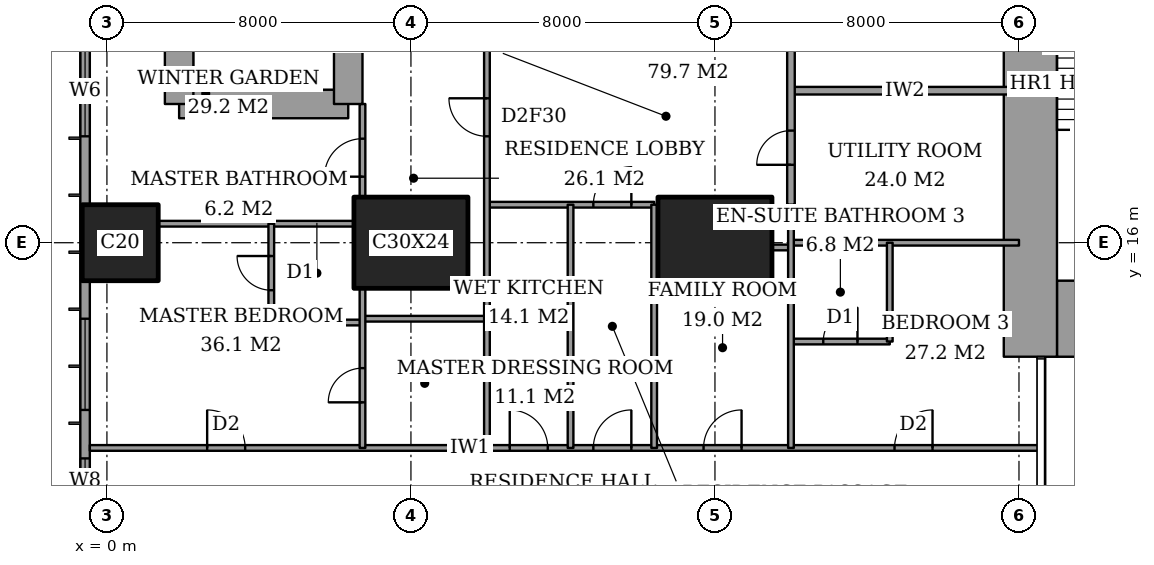
"""IFC4 building model, lengths in metres.
Left out: names, types, materials, properties, quantities, classifications, styles, units other than length and angle.
Written with IfcOpenShell. Run it as: python <this file> out.ifc"""

import sys

from ifc_helpers import new_model, si_unit, direction, frame, frame_2d, origin, origin_2d, place, context, subcontext, project, spatial, rectangle, extrude, element, fill, save


model = new_model("IFC4")
c1 = context("Model", 3, precision=1e-05, world=origin(), true_north=direction((0.0, 1.0)))
c2 = subcontext(c1, "Body", "Model", "MODEL_VIEW")
j1 = project(units=[si_unit("LENGTHUNIT", "METRE"), si_unit("PLANEANGLEUNIT", "RADIAN")], contexts=[c1])
p1 = place(None, origin())
s1 = spatial("IfcSite", under=j1, at=p1, CompositionType="ELEMENT")
p2 = place(p1, origin())
s2 = spatial("IfcBuilding", under=s1, at=p2, CompositionType="ELEMENT")
p3 = place(p2, frame((0.0, 0.0, 44.0)))
s3 = spatial("IfcBuildingStorey", under=s2, at=p3, CompositionType="ELEMENT", Elevation=44.0)
p4 = place(p3, frame((0.35, 16.0, 0.0), z_axis=(0.0, 0.0, 1.0), x_axis=(1.0, 0.0, 0.0)))
e1 = element("IfcColumn", 1, at=p4, inside=s3, PredefinedType="COLUMN", context=c2, shape_type="SweptSolid", body=[
    extrude(rectangle(XDim=2.0, YDim=2.0, at=origin_2d()), origin(), (0.0, 0.0, 1.0), 3.6),
])
for number, where, z_axis, x_axis in (
    (2, (8.0, 16.0, 0.0), (0.0, 0.0, 1.0), (1.0, 0.0, 0.0)),
    (3, (16.0, 16.0, 0.0), (0.0, 0.0, 1.0), (1.0, 0.0, 0.0)),
):
    element("IfcColumn", number, at=place(p3, frame(where, z_axis=z_axis, x_axis=x_axis)), inside=s3, PredefinedType="COLUMN", context=c2, shape_type="SweptSolid", body=[
        extrude(rectangle(XDim=3.0, YDim=2.4, at=origin_2d()), origin(), (0.0, 0.0, 1.0), 3.6),
    ])
p5 = place(p3, frame((25.0, 14.0, 0.0), z_axis=(0.0, 0.0, 1.0), x_axis=(1.0, 0.0, 0.0)))
e4 = element("IfcWall", 4, at=p5, inside=s3, PredefinedType="SHEAR", context=c2, shape_type="SweptSolid", body=[
    extrude(rectangle(XDim=3.15, YDim=2.0, at=frame_2d((1.575, 0.0))), origin(), (0.0, 0.0, 1.0), 3.6),
])
p6 = place(p3, frame((24.3, 13.0, 0.0), z_axis=(0.0, 0.0, 1.0), x_axis=(0.0, 1.0, 0.0)))
e5 = element("IfcWall", 5, at=p6, inside=s3, PredefinedType="SHEAR", context=c2, shape_type="SweptSolid", body=[
    extrude(rectangle(XDim=10.15, YDim=1.4, at=frame_2d((5.075, 0.0))), origin(), (0.0, 0.0, 1.0), 3.6),
])
p7 = place(p3, frame((1.9, 19.65, 0.0), z_axis=(0.0, 0.0, 1.0), x_axis=(1.0, 0.0, 0.0)))
e6 = element("IfcWall", 6, at=p7, inside=s3, PredefinedType="SHEAR", context=c2, shape_type="SweptSolid", body=[
    extrude(rectangle(XDim=4.45, YDim=0.75, at=frame_2d((2.225, 0.0))), origin(), (0.0, 0.0, 1.0), 3.6),
])
p8 = place(p3, frame((6.35, 19.65, 0.0), z_axis=(0.0, 0.0, 1.0), x_axis=(0.0, 1.0, 0.0)))
e7 = element("IfcWall", 7, at=p8, inside=s3, PredefinedType="SHEAR", context=c2, shape_type="SweptSolid", body=[
    extrude(rectangle(XDim=8.7, YDim=0.75, at=frame_2d((4.35, 0.0))), origin(), (0.0, 0.0, 1.0), 3.6),
])
p9 = place(p8, frame((6.725, 0.0, 0.0)))
e8 = element("IfcOpeningElement", 8, at=p9, cuts=e7, PredefinedType="OPENING", context=c2, shape_type="SweptSolid", body=[
    extrude(rectangle(XDim=1.0, YDim=2.1, at=frame_2d((0.5, 1.05))), frame((0.0, 0.385, 0.0), z_axis=(0.0, -1.0, 0.0), x_axis=(1.0, 0.0, 0.0)), (0.0, 0.0, 1.0), 0.77),
])
p10 = place(p3, frame((1.9, 28.35, 0.0), z_axis=(0.0, 0.0, 1.0), x_axis=(0.0, -1.0, 0.0)))
e9 = element("IfcWall", 9, at=p10, inside=s3, PredefinedType="SHEAR", context=c2, shape_type="SweptSolid", body=[
    extrude(rectangle(XDim=8.7, YDim=0.75, at=frame_2d((4.35, 0.0))), origin(), (0.0, 0.0, 1.0), 3.6),
])
p11 = place(p3, frame((-0.575, 44.825, 0.0), z_axis=(0.0, 0.0, 1.0), x_axis=(0.0, -1.0, 0.0)))
e10 = element("IfcWall", 10, at=p11, inside=s3, PredefinedType="SOLIDWALL", context=c2, shape_type="SweptSolid", body=[
    extrude(rectangle(XDim=41.65, YDim=0.25, at=frame_2d((20.825, 0.0))), origin(), (0.0, 0.0, 1.0), 3.6),
])
p12 = place(p11, frame((0.775, 0.0, 0.6)))
e11 = element("IfcOpeningElement", 11, at=p12, cuts=e10, PredefinedType="OPENING", context=c2, shape_type="SweptSolid", body=[
    extrude(rectangle(XDim=2.4, YDim=2.0, at=frame_2d((1.2, 1.0))), frame((0.0, 0.135, 0.0), z_axis=(0.0, -1.0, 0.0), x_axis=(1.0, 0.0, 0.0)), (0.0, 0.0, 1.0), 0.27),
])
p13 = place(p11, frame((6.1, 0.0, 0.6)))
e12 = element("IfcOpeningElement", 12, at=p13, cuts=e10, PredefinedType="OPENING", context=c2, shape_type="SweptSolid", body=[
    extrude(rectangle(XDim=1.2, YDim=2.0, at=frame_2d((0.6, 1.0))), frame((0.0, 0.135, 0.0), z_axis=(0.0, -1.0, 0.0), x_axis=(1.0, 0.0, 0.0)), (0.0, 0.0, 1.0), 0.27),
])
p14 = place(p11, frame((8.425, 0.0, 0.6)))
e13 = element("IfcOpeningElement", 13, at=p14, cuts=e10, PredefinedType="OPENING", context=c2, shape_type="SweptSolid", body=[
    extrude(rectangle(XDim=2.4, YDim=2.0, at=frame_2d((1.2, 1.0))), frame((0.0, 0.135, 0.0), z_axis=(0.0, -1.0, 0.0), x_axis=(1.0, 0.0, 0.0)), (0.0, 0.0, 1.0), 0.27),
])
p15 = place(p11, frame((15.625, 0.0, 0.6)))
e14 = element("IfcOpeningElement", 14, at=p15, cuts=e10, PredefinedType="OPENING", context=c2, shape_type="SweptSolid", body=[
    extrude(rectangle(XDim=2.4, YDim=2.0, at=frame_2d((1.2, 1.0))), frame((0.0, 0.135, 0.0), z_axis=(0.0, -1.0, 0.0), x_axis=(1.0, 0.0, 0.0)), (0.0, 0.0, 1.0), 0.27),
])
p16 = place(p11, frame((23.625, 0.0, 0.6)))
e15 = element("IfcOpeningElement", 15, at=p16, cuts=e10, PredefinedType="OPENING", context=c2, shape_type="SweptSolid", body=[
    extrude(rectangle(XDim=2.4, YDim=2.0, at=frame_2d((1.2, 1.0))), frame((0.0, 0.135, 0.0), z_axis=(0.0, -1.0, 0.0), x_axis=(1.0, 0.0, 0.0)), (0.0, 0.0, 1.0), 0.27),
])
p17 = place(p11, frame((30.825, 0.0, 0.6)))
e16 = element("IfcOpeningElement", 16, at=p17, cuts=e10, PredefinedType="OPENING", context=c2, shape_type="SweptSolid", body=[
    extrude(rectangle(XDim=2.4, YDim=2.0, at=frame_2d((1.2, 1.0))), frame((0.0, 0.135, 0.0), z_axis=(0.0, -1.0, 0.0), x_axis=(1.0, 0.0, 0.0)), (0.0, 0.0, 1.0), 0.27),
])
p18 = place(p11, frame((34.5, 0.0, 0.6)))
e17 = element("IfcOpeningElement", 17, at=p18, cuts=e10, PredefinedType="OPENING", context=c2, shape_type="SweptSolid", body=[
    extrude(rectangle(XDim=1.2, YDim=2.0, at=frame_2d((0.6, 1.0))), frame((0.0, 0.135, 0.0), z_axis=(0.0, -1.0, 0.0), x_axis=(1.0, 0.0, 0.0)), (0.0, 0.0, 1.0), 0.27),
])
p19 = place(p11, frame((38.475, 0.0, 0.6)))
e18 = element("IfcOpeningElement", 18, at=p19, cuts=e10, PredefinedType="OPENING", context=c2, shape_type="SweptSolid", body=[
    extrude(rectangle(XDim=2.4, YDim=2.0, at=frame_2d((1.2, 1.0))), frame((0.0, 0.135, 0.0), z_axis=(0.0, -1.0, 0.0), x_axis=(1.0, 0.0, 0.0)), (0.0, 0.0, 1.0), 0.27),
])
p20 = place(p3, frame((-0.45, 10.6, 0.0), z_axis=(0.0, 0.0, 1.0), x_axis=(1.0, 0.0, 0.0)))
e19 = element("IfcWall", 19, at=p20, inside=s3, PredefinedType="PARTITIONING", context=c2, shape_type="SweptSolid", body=[
    extrude(rectangle(XDim=25.011, YDim=0.15, at=frame_2d((12.505, 0.0))), origin(), (0.0, 0.0, 1.0), 3.35),
])
p21 = place(p20, frame((13.25, 0.0, 0.0)))
e20 = element("IfcOpeningElement", 20, at=p21, cuts=e19, PredefinedType="OPENING", context=c2, shape_type="SweptSolid", body=[
    extrude(rectangle(XDim=1.0, YDim=2.1, at=frame_2d((0.5, 1.05))), frame((0.0, 0.085, 0.0), z_axis=(0.0, -1.0, 0.0), x_axis=(1.0, 0.0, 0.0)), (0.0, 0.0, 1.0), 0.17),
])
p22 = place(p20, frame((3.087, 0.0, 0.0)))
e21 = element("IfcOpeningElement", 21, at=p22, cuts=e19, PredefinedType="OPENING", context=c2, shape_type="SweptSolid", body=[
    extrude(rectangle(XDim=1.0, YDim=2.1, at=frame_2d((0.5, 1.05))), frame((0.0, 0.085, 0.0), z_axis=(0.0, -1.0, 0.0), x_axis=(1.0, 0.0, 0.0)), (0.0, 0.0, 1.0), 0.17),
])
p23 = place(p20, frame((11.05, 0.0, 0.0)))
e22 = element("IfcOpeningElement", 22, at=p23, cuts=e19, PredefinedType="OPENING", context=c2, shape_type="SweptSolid", body=[
    extrude(rectangle(XDim=1.0, YDim=2.1, at=frame_2d((0.5, 1.05))), frame((0.0, 0.085, 0.0), z_axis=(0.0, -1.0, 0.0), x_axis=(1.0, 0.0, 0.0)), (0.0, 0.0, 1.0), 0.17),
])
p24 = place(p20, frame((16.15, 0.0, 0.0)))
e23 = element("IfcOpeningElement", 23, at=p24, cuts=e19, PredefinedType="OPENING", context=c2, shape_type="SweptSolid", body=[
    extrude(rectangle(XDim=1.0, YDim=2.1, at=frame_2d((0.5, 1.05))), frame((0.0, 0.085, 0.0), z_axis=(0.0, -1.0, 0.0), x_axis=(1.0, 0.0, 0.0)), (0.0, 0.0, 1.0), 0.17),
])
p25 = place(p20, frame((21.175, 0.0, 0.0)))
e24 = element("IfcOpeningElement", 24, at=p25, cuts=e19, PredefinedType="OPENING", context=c2, shape_type="SweptSolid", body=[
    extrude(rectangle(XDim=1.0, YDim=2.1, at=frame_2d((0.5, 1.05))), frame((0.0, 0.085, 0.0), z_axis=(0.0, -1.0, 0.0), x_axis=(1.0, 0.0, 0.0)), (0.0, 0.0, 1.0), 0.17),
])
p26 = place(p3, frame((18.0, 13.4, 0.0), z_axis=(0.0, 0.0, 1.0), x_axis=(1.0, 0.0, 0.0)))
e25 = element("IfcWall", 25, at=p26, inside=s3, PredefinedType="PARTITIONING", context=c2, shape_type="SweptSolid", body=[
    extrude(rectangle(XDim=2.6, YDim=0.15, at=frame_2d((1.3, 0.0))), origin(), (0.0, 0.0, 1.0), 3.35),
])
p27 = place(p26, frame((0.85, 0.0, 0.0)))
e26 = element("IfcOpeningElement", 26, at=p27, cuts=e25, PredefinedType="OPENING", context=c2, shape_type="SweptSolid", body=[
    extrude(rectangle(XDim=0.9, YDim=2.1, at=frame_2d((0.45, 1.05))), frame((0.0, 0.085, 0.0), z_axis=(0.0, -1.0, 0.0), x_axis=(1.0, 0.0, 0.0)), (0.0, 0.0, 1.0), 0.17),
])
p28 = place(p3, frame((4.325, 13.9, 0.0), z_axis=(0.0, 0.0, 1.0), x_axis=(1.0, 0.0, 0.0)))
e27 = element("IfcWall", 27, at=p28, inside=s3, PredefinedType="PARTITIONING", context=c2, shape_type="SweptSolid", body=[
    extrude(rectangle(XDim=2.4, YDim=0.15, at=frame_2d((1.2, 0.0))), origin(), (0.0, 0.0, 1.0), 3.35),
])
p29 = place(p3, frame((6.725, 14.0, 0.0), z_axis=(0.0, 0.0, 1.0), x_axis=(1.0, 0.0, 0.0)))
e28 = element("IfcWall", 28, at=p29, inside=s3, PredefinedType="PARTITIONING", context=c2, shape_type="SweptSolid", body=[
    extrude(rectangle(XDim=3.275, YDim=0.15, at=frame_2d((1.637, 0.0))), origin(), (0.0, 0.0, 1.0), 3.35),
])
p30 = place(p3, frame((17.5, 15.875, 0.0), z_axis=(0.0, 0.0, 1.0), x_axis=(1.0, 0.0, 0.0)))
e29 = element("IfcWall", 29, at=p30, inside=s3, PredefinedType="PARTITIONING", context=c2, shape_type="SweptSolid", body=[
    extrude(rectangle(XDim=0.5, YDim=0.15, at=frame_2d((0.25, 0.0))), origin(), (0.0, 0.0, 1.0), 2.634),
])
p31 = place(p3, frame((18.0, 16.0, 0.0), z_axis=(0.0, 0.0, 1.0), x_axis=(1.0, 0.0, 0.0)))
e30 = element("IfcWall", 30, at=p31, inside=s3, PredefinedType="PARTITIONING", context=c2, shape_type="SweptSolid", body=[
    extrude(rectangle(XDim=6.0, YDim=0.15, at=frame_2d((3.0, 0.0))), origin(), (0.0, 0.0, 1.0), 2.634),
])
p32 = place(p3, frame((1.35, 16.5, 0.0), z_axis=(0.0, 0.0, 1.0), x_axis=(1.0, 0.0, 0.0)))
e31 = element("IfcWall", 31, at=p32, inside=s3, PredefinedType="PARTITIONING", context=c2, shape_type="SweptSolid", body=[
    extrude(rectangle(XDim=5.15, YDim=0.15, at=frame_2d((2.575, 0.0))), origin(), (0.0, 0.0, 1.0), 3.35),
])
p33 = place(p3, frame((10.0, 17.0, 0.0), z_axis=(0.0, 0.0, 1.0), x_axis=(1.0, 0.0, 0.0)))
e32 = element("IfcWall", 32, at=p33, inside=s3, PredefinedType="PARTITIONING", context=c2, shape_type="SweptSolid", body=[
    extrude(rectangle(XDim=4.4, YDim=0.15, at=frame_2d((2.2, 0.0))), origin(), (0.0, 0.0, 1.0), 3.35),
])
p34 = place(p33, frame((2.8, 0.0, 0.0)))
e33 = element("IfcOpeningElement", 33, at=p34, cuts=e32, PredefinedType="OPENING", context=c2, shape_type="SweptSolid", body=[
    extrude(rectangle(XDim=1.0, YDim=2.1, at=frame_2d((0.5, 1.05))), frame((0.0, 0.085, 0.0), z_axis=(0.0, -1.0, 0.0), x_axis=(1.0, 0.0, 0.0)), (0.0, 0.0, 1.0), 0.17),
])
p35 = place(p3, frame((18.0, 20.0, 0.0), z_axis=(0.0, 0.0, 1.0), x_axis=(1.0, 0.0, 0.0)))
e34 = element("IfcWall", 34, at=p35, inside=s3, PredefinedType="PARTITIONING", context=c2, shape_type="SweptSolid", body=[
    extrude(rectangle(XDim=6.0, YDim=0.2, at=frame_2d((3.0, 0.0))), origin(), (0.0, 0.0, 1.0), 3.35),
])
p36 = place(p3, frame((4.325, 13.9, 0.0), z_axis=(0.0, 0.0, 1.0), x_axis=(0.0, 1.0, 0.0)))
e35 = element("IfcWall", 35, at=p36, inside=s3, PredefinedType="PARTITIONING", context=c2, shape_type="SweptSolid", body=[
    extrude(rectangle(XDim=2.6, YDim=0.15, at=frame_2d((1.3, 0.0))), origin(), (0.0, 0.0, 1.0), 3.35),
])
p37 = place(p36, frame((0.85, 0.0, 0.0)))
e36 = element("IfcOpeningElement", 36, at=p37, cuts=e35, PredefinedType="OPENING", context=c2, shape_type="SweptSolid", body=[
    extrude(rectangle(XDim=0.9, YDim=2.1, at=frame_2d((0.45, 1.05))), frame((0.0, 0.085, 0.0), z_axis=(0.0, -1.0, 0.0), x_axis=(1.0, 0.0, 0.0)), (0.0, 0.0, 1.0), 0.17),
])
p38 = place(p3, frame((6.725, 10.6, 0.0), z_axis=(0.0, 0.0, 1.0), x_axis=(0.0, 1.0, 0.0)))
e37 = element("IfcWall", 37, at=p38, inside=s3, PredefinedType="PARTITIONING", context=c2, shape_type="SweptSolid", body=[
    extrude(rectangle(XDim=4.2, YDim=0.15, at=frame_2d((2.1, 0.0))), origin(), (0.0, 0.0, 1.0), 3.35),
])
p39 = place(p38, frame((1.2, 0.0, 0.0)))
e38 = element("IfcOpeningElement", 38, at=p39, cuts=e37, PredefinedType="OPENING", context=c2, shape_type="SweptSolid", body=[
    extrude(rectangle(XDim=0.9, YDim=2.1, at=frame_2d((0.45, 1.05))), frame((0.0, 0.085, 0.0), z_axis=(0.0, -1.0, 0.0), x_axis=(1.0, 0.0, 0.0)), (0.0, 0.0, 1.0), 0.17),
])
p40 = place(p3, frame((6.725, 17.2, 0.0), z_axis=(0.0, 0.0, 1.0), x_axis=(0.0, 1.0, 0.0)))
e39 = element("IfcWall", 39, at=p40, inside=s3, PredefinedType="PARTITIONING", context=c2, shape_type="SweptSolid", body=[
    extrude(rectangle(XDim=2.45, YDim=0.15, at=frame_2d((1.225, 0.0))), origin(), (0.0, 0.0, 1.0), 3.35),
])
p41 = place(p40, frame((0.538, 0.0, 0.0)))
e40 = element("IfcOpeningElement", 40, at=p41, cuts=e39, PredefinedType="OPENING", context=c2, shape_type="SweptSolid", body=[
    extrude(rectangle(XDim=1.0, YDim=2.1, at=frame_2d((0.5, 1.05))), frame((0.0, 0.085, 0.0), z_axis=(0.0, -1.0, 0.0), x_axis=(1.0, 0.0, 0.0)), (0.0, 0.0, 1.0), 0.17),
])
p42 = place(p3, frame((10.0, 10.6, 0.0), z_axis=(0.0, 0.0, 1.0), x_axis=(0.0, 1.0, 0.0)))
e41 = element("IfcWall", 41, at=p42, inside=s3, PredefinedType="PARTITIONING", context=c2, shape_type="SweptSolid", body=[
    extrude(rectangle(XDim=11.0, YDim=0.15, at=frame_2d((5.5, 0.0))), origin(), (0.0, 0.0, 1.0), 3.35),
])
p43 = place(p42, frame((8.2, 0.0, 0.0)))
e42 = element("IfcOpeningElement", 42, at=p43, cuts=e41, PredefinedType="OPENING", context=c2, shape_type="SweptSolid", body=[
    extrude(rectangle(XDim=1.0, YDim=2.1, at=frame_2d((0.5, 1.05))), frame((0.0, 0.085, 0.0), z_axis=(0.0, -1.0, 0.0), x_axis=(1.0, 0.0, 0.0)), (0.0, 0.0, 1.0), 0.17),
])
for number, where, z_axis, x_axis in (
    (43, (12.2, 10.6, 0.0), (0.0, 0.0, 1.0), (0.0, 1.0, 0.0)),
    (44, (14.4, 10.6, 0.0), (0.0, 0.0, 1.0), (0.0, 1.0, 0.0)),
):
    element("IfcWall", number, at=place(p3, frame(where, z_axis=z_axis, x_axis=x_axis)), inside=s3, PredefinedType="PARTITIONING", context=c2, shape_type="SweptSolid", body=[
        extrude(rectangle(XDim=6.4, YDim=0.15, at=frame_2d((3.2, 0.0))), origin(), (0.0, 0.0, 1.0), 3.35),
    ])
p44 = place(p3, frame((18.0, 17.0, 0.0), z_axis=(0.0, 0.0, 1.0), x_axis=(0.0, 1.0, 0.0)))
e45 = element("IfcWall", 45, at=p44, inside=s3, PredefinedType="PARTITIONING", context=c2, shape_type="SweptSolid", body=[
    extrude(rectangle(XDim=7.0, YDim=0.2, at=frame_2d((3.5, 0.0))), origin(), (0.0, 0.0, 1.0), 3.35),
])
p45 = place(p44, frame((4.4, 0.0, 0.0)))
e46 = element("IfcOpeningElement", 46, at=p45, cuts=e45, PredefinedType="OPENING", context=c2, shape_type="SweptSolid", body=[
    extrude(rectangle(XDim=1.2, YDim=2.4, at=frame_2d((0.6, 1.2))), frame((0.0, 0.11, 0.0), z_axis=(0.0, -1.0, 0.0), x_axis=(1.0, 0.0, 0.0)), (0.0, 0.0, 1.0), 0.22),
])
p46 = place(p44, frame((1.05, 0.0, 0.0)))
e47 = element("IfcOpeningElement", 47, at=p46, cuts=e45, PredefinedType="OPENING", context=c2, shape_type="SweptSolid", body=[
    extrude(rectangle(XDim=0.9, YDim=2.1, at=frame_2d((0.45, 1.05))), frame((0.0, 0.11, 0.0), z_axis=(0.0, -1.0, 0.0), x_axis=(1.0, 0.0, 0.0)), (0.0, 0.0, 1.0), 0.22),
])
p47 = place(p3, frame((18.0, 10.6, 0.0), z_axis=(0.0, 0.0, 1.0), x_axis=(0.0, 1.0, 0.0)))
e48 = element("IfcWall", 48, at=p47, inside=s3, PredefinedType="PARTITIONING", context=c2, shape_type="SweptSolid", body=[
    extrude(rectangle(XDim=6.4, YDim=0.15, at=frame_2d((3.2, 0.0))), origin(), (0.0, 0.0, 1.0), 3.35),
])
p48 = place(p3, frame((20.6, 13.4, 0.0), z_axis=(0.0, 0.0, 1.0), x_axis=(0.0, 1.0, 0.0)))
e49 = element("IfcWall", 49, at=p48, inside=s3, PredefinedType="PARTITIONING", context=c2, shape_type="SweptSolid", body=[
    extrude(rectangle(XDim=2.6, YDim=0.15, at=frame_2d((1.3, 0.0))), origin(), (0.0, 0.0, 1.0), 3.35),
])
p49 = place(p16, origin())
e50 = element("IfcWindow", 50, at=p49, inside=s3, PartitioningType="SINGLE_PANEL", PredefinedType="WINDOW", context=c2, shape_type="SweptSolid", body=[
    extrude(rectangle(XDim=2.4, YDim=2.0, at=frame_2d((1.2, 1.0))), frame((0.0, 0.03, 0.0), z_axis=(0.0, -1.0, 0.0), x_axis=(1.0, 0.0, 0.0)), (0.0, 0.0, 1.0), 0.06),
])
fill(e15, e50)
p50 = place(p17, origin())
e51 = element("IfcWindow", 51, at=p50, inside=s3, PartitioningType="SINGLE_PANEL", PredefinedType="WINDOW", context=c2, shape_type="SweptSolid", body=[
    extrude(rectangle(XDim=2.4, YDim=2.0, at=frame_2d((1.2, 1.0))), frame((0.0, 0.03, 0.0), z_axis=(0.0, -1.0, 0.0), x_axis=(1.0, 0.0, 0.0)), (0.0, 0.0, 1.0), 0.06),
])
fill(e16, e51)
p51 = place(p18, origin())
e52 = element("IfcWindow", 52, at=p51, inside=s3, PartitioningType="SINGLE_PANEL", PredefinedType="WINDOW", context=c2, shape_type="SweptSolid", body=[
    extrude(rectangle(XDim=1.2, YDim=2.0, at=frame_2d((0.6, 1.0))), frame((0.0, 0.03, 0.0), z_axis=(0.0, -1.0, 0.0), x_axis=(1.0, 0.0, 0.0)), (0.0, 0.0, 1.0), 0.06),
])
fill(e17, e52)
p52 = place(p21, origin())
e53 = element("IfcDoor", 53, at=p52, inside=s3, OperationType="SINGLE_SWING_LEFT", PredefinedType="DOOR", context=c2, shape_type="SweptSolid", body=[
    extrude(rectangle(XDim=1.0, YDim=2.1, at=frame_2d((0.5, 1.05))), frame((0.0, 0.025, 0.0), z_axis=(0.0, -1.0, 0.0), x_axis=(1.0, 0.0, 0.0)), (0.0, 0.0, 1.0), 0.05),
])
fill(e20, e53)
p53 = place(p37, origin())
e54 = element("IfcDoor", 54, at=p53, inside=s3, OperationType="SINGLE_SWING_LEFT", PredefinedType="DOOR", context=c2, shape_type="SweptSolid", body=[
    extrude(rectangle(XDim=0.9, YDim=2.1, at=frame_2d((0.45, 1.05))), frame((0.0, 0.025, 0.0), z_axis=(0.0, -1.0, 0.0), x_axis=(1.0, 0.0, 0.0)), (0.0, 0.0, 1.0), 0.05),
])
fill(e36, e54)
p54 = place(p22, origin())
e55 = element("IfcDoor", 55, at=p54, inside=s3, OperationType="SINGLE_SWING_RIGHT", PredefinedType="DOOR", context=c2, shape_type="SweptSolid", body=[
    extrude(rectangle(XDim=1.0, YDim=2.1, at=frame_2d((0.5, 1.05))), frame((0.0, 0.025, 0.0), z_axis=(0.0, -1.0, 0.0), x_axis=(1.0, 0.0, 0.0)), (0.0, 0.0, 1.0), 0.05),
])
fill(e21, e55)
p55 = place(p41, origin())
e56 = element("IfcDoor", 56, at=p55, inside=s3, OperationType="SINGLE_SWING_RIGHT", PredefinedType="DOOR", context=c2, shape_type="SweptSolid", body=[
    extrude(rectangle(XDim=1.0, YDim=2.1, at=frame_2d((0.5, 1.05))), frame((0.0, 0.025, 0.0), z_axis=(0.0, -1.0, 0.0), x_axis=(1.0, 0.0, 0.0)), (0.0, 0.0, 1.0), 0.05),
])
fill(e40, e56)
p56 = place(p39, origin())
e57 = element("IfcDoor", 57, at=p56, inside=s3, OperationType="SINGLE_SWING_RIGHT", PredefinedType="DOOR", context=c2, shape_type="SweptSolid", body=[
    extrude(rectangle(XDim=0.9, YDim=2.1, at=frame_2d((0.45, 1.05))), frame((0.0, 0.025, 0.0), z_axis=(0.0, -1.0, 0.0), x_axis=(1.0, 0.0, 0.0)), (0.0, 0.0, 1.0), 0.05),
])
fill(e38, e57)
p57 = place(p43, origin())
e58 = element("IfcDoor", 58, at=p57, inside=s3, OperationType="SINGLE_SWING_LEFT", PredefinedType="DOOR", context=c2, shape_type="SweptSolid", body=[
    extrude(rectangle(XDim=1.0, YDim=2.1, at=frame_2d((0.5, 1.05))), frame((0.0, 0.025, 0.0), z_axis=(0.0, -1.0, 0.0), x_axis=(1.0, 0.0, 0.0)), (0.0, 0.0, 1.0), 0.05),
])
fill(e42, e58)
p58 = place(p23, origin())
e59 = element("IfcDoor", 59, at=p58, inside=s3, OperationType="SINGLE_SWING_RIGHT", PredefinedType="DOOR", context=c2, shape_type="SweptSolid", body=[
    extrude(rectangle(XDim=1.0, YDim=2.1, at=frame_2d((0.5, 1.05))), frame((0.0, 0.025, 0.0), z_axis=(0.0, -1.0, 0.0), x_axis=(1.0, 0.0, 0.0)), (0.0, 0.0, 1.0), 0.05),
])
fill(e22, e59)
p59 = place(p34, origin())
e60 = element("IfcDoor", 60, at=p59, inside=s3, OperationType="SINGLE_SWING_LEFT", PredefinedType="DOOR", context=c2, shape_type="SweptSolid", body=[
    extrude(rectangle(XDim=1.0, YDim=2.1, at=frame_2d((0.5, 1.05))), frame((0.0, 0.025, 0.0), z_axis=(0.0, -1.0, 0.0), x_axis=(1.0, 0.0, 0.0)), (0.0, 0.0, 1.0), 0.05),
])
fill(e33, e60)
p60 = place(p24, origin())
e61 = element("IfcDoor", 61, at=p60, inside=s3, OperationType="SINGLE_SWING_LEFT", PredefinedType="DOOR", context=c2, shape_type="SweptSolid", body=[
    extrude(rectangle(XDim=1.0, YDim=2.1, at=frame_2d((0.5, 1.05))), frame((0.0, 0.025, 0.0), z_axis=(0.0, -1.0, 0.0), x_axis=(1.0, 0.0, 0.0)), (0.0, 0.0, 1.0), 0.05),
])
fill(e23, e61)
p61 = place(p27, origin())
e62 = element("IfcDoor", 62, at=p61, inside=s3, OperationType="SINGLE_SWING_LEFT", PredefinedType="DOOR", context=c2, shape_type="SweptSolid", body=[
    extrude(rectangle(XDim=0.9, YDim=2.1, at=frame_2d((0.45, 1.05))), frame((0.0, 0.025, 0.0), z_axis=(0.0, -1.0, 0.0), x_axis=(1.0, 0.0, 0.0)), (0.0, 0.0, 1.0), 0.05),
])
fill(e26, e62)
p62 = place(p25, origin())
e63 = element("IfcDoor", 63, at=p62, inside=s3, OperationType="SINGLE_SWING_LEFT", PredefinedType="DOOR", context=c2, shape_type="SweptSolid", body=[
    extrude(rectangle(XDim=1.0, YDim=2.1, at=frame_2d((0.5, 1.05))), frame((0.0, 0.025, 0.0), z_axis=(0.0, -1.0, 0.0), x_axis=(1.0, 0.0, 0.0)), (0.0, 0.0, 1.0), 0.05),
])
fill(e24, e63)
p63 = place(p46, origin())
e64 = element("IfcDoor", 64, at=p63, inside=s3, OperationType="SINGLE_SWING_RIGHT", PredefinedType="DOOR", context=c2, shape_type="SweptSolid", body=[
    extrude(rectangle(XDim=0.9, YDim=2.1, at=frame_2d((0.45, 1.05))), frame((0.0, 0.025, 0.0), z_axis=(0.0, -1.0, 0.0), x_axis=(1.0, 0.0, 0.0)), (0.0, 0.0, 1.0), 0.05),
])
fill(e47, e64)
save(model, sys.argv[1])
